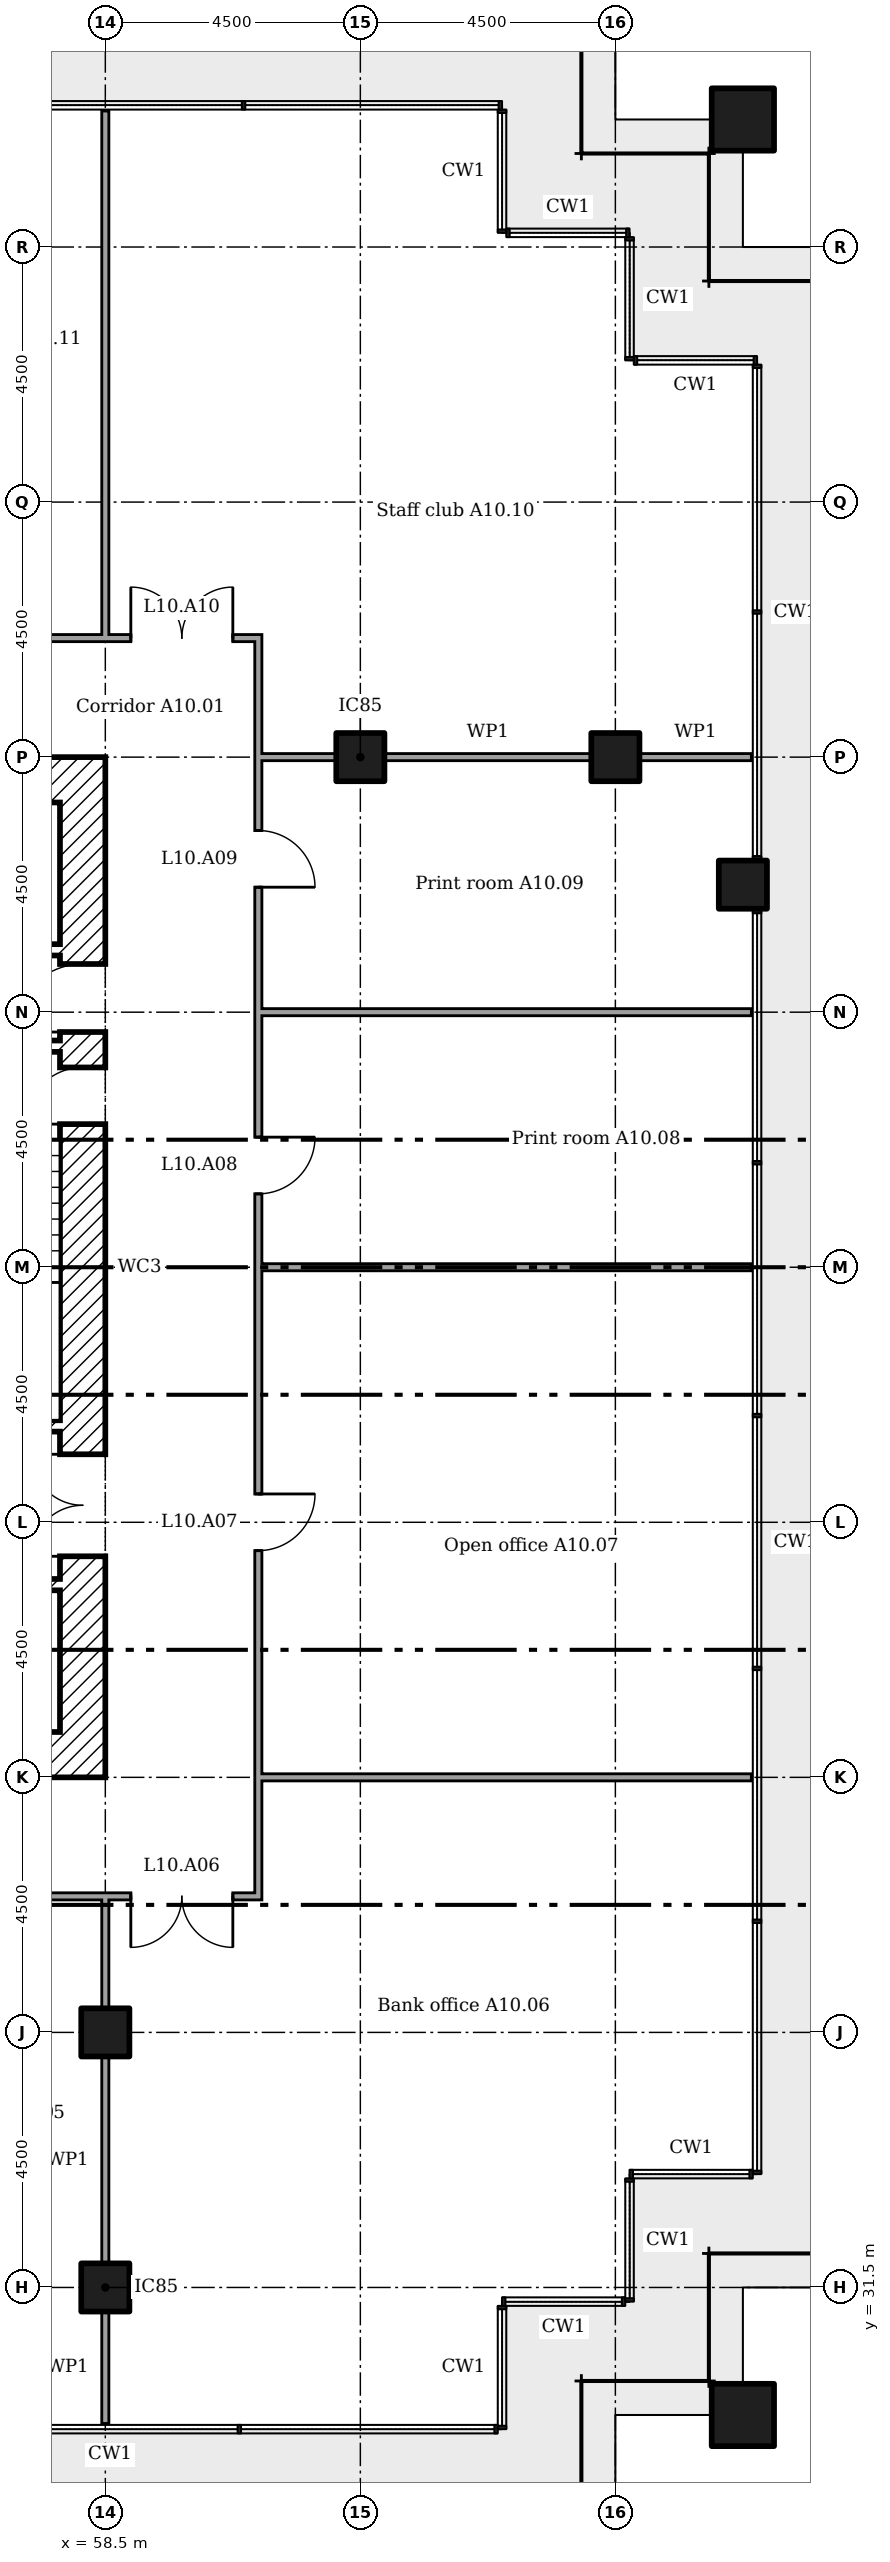
"""IFC4 building model, lengths in metres.
Left out: names, types, materials, properties, quantities, classifications, styles, units other than length and angle.
Written with IfcOpenShell. Run it as: python <this file> out.ifc"""

import sys

from ifc_helpers import new_model, si_unit, direction, frame, frame_2d, origin, origin_2d, place, context, subcontext, project, spatial, rectangle, extrude, element, fill, save


model = new_model("IFC4")
c1 = context("Model", 3, precision=1e-05, world=origin(), true_north=direction((0.0, 1.0)))
c2 = subcontext(c1, "Body", "Model", "MODEL_VIEW")
j1 = project(units=[si_unit("LENGTHUNIT", "METRE"), si_unit("PLANEANGLEUNIT", "RADIAN")], contexts=[c1])
p1 = place(None, origin())
s1 = spatial("IfcSite", under=j1, at=p1, CompositionType="ELEMENT")
p2 = place(p1, origin())
s2 = spatial("IfcBuilding", under=s1, at=p2, CompositionType="ELEMENT")
p3 = place(p2, frame((0.0, 0.0, 47.4)))
s3 = spatial("IfcBuildingStorey", under=s2, at=p3, CompositionType="ELEMENT", Elevation=47.4)
for number, where in (
    (1, (69.75, 29.25, 0.0)),
    (2, (69.75, 69.75, 0.0)),
):
    element("IfcColumn", number, at=place(p3, frame(where)), inside=s3, PredefinedType="COLUMN", context=c2, shape_type="SweptSolid", body=[
        extrude(rectangle(XDim=1.1, YDim=1.1, at=origin_2d()), origin(), (0.0, 0.0, 1.0), 3.6),
    ])
for number, where in (
    (3, (58.5, 31.5, 0.0)),
    (4, (58.5, 36.0, 0.0)),
    (5, (63.0, 58.5, 0.0)),
    (6, (67.5, 58.5, 0.0)),
    (7, (69.75, 56.25, 0.0)),
):
    element("IfcColumn", number, at=place(p3, frame(where)), inside=s3, PredefinedType="COLUMN", context=c2, shape_type="SweptSolid", body=[
        extrude(rectangle(XDim=0.85, YDim=0.85, at=origin_2d()), origin(), (0.0, 0.0, 1.0), 3.6),
    ])
p4 = place(p3, frame((58.1, 40.5, 0.0), z_axis=(0.0, 0.0, 1.0), x_axis=(0.0, 1.0, 0.0)))
e8 = element("IfcWall", 8, at=p4, inside=s3, PredefinedType="SHEAR", context=c2, shape_type="SweptSolid", body=[
    extrude(rectangle(XDim=18.0, YDim=0.8, at=frame_2d((9.0, 0.0))), origin(), (0.0, 0.0, 1.0), 3.35),
])
p5 = place(p4, frame((13.15, 0.0, 0.0)))
e9 = element("IfcOpeningElement", 9, at=p5, cuts=e8, PredefinedType="OPENING", context=c2, shape_type="SweptSolid", body=[
    extrude(rectangle(XDim=1.2, YDim=2.1, at=frame_2d((0.6, 1.05))), frame((0.0, 0.41, 0.0), z_axis=(0.0, -1.0, 0.0), x_axis=(1.0, 0.0, 0.0)), (0.0, 0.0, 1.0), 0.82),
])
p6 = place(p4, frame((3.9, 0.0, 0.0)))
e10 = element("IfcOpeningElement", 10, at=p6, cuts=e8, PredefinedType="OPENING", context=c2, shape_type="SweptSolid", body=[
    extrude(rectangle(XDim=1.8, YDim=2.1, at=frame_2d((0.9, 1.05))), frame((0.0, 0.41, 0.0), z_axis=(0.0, -1.0, 0.0), x_axis=(1.0, 0.0, 0.0)), (0.0, 0.0, 1.0), 0.82),
])
p7 = place(p4, frame((11.525, 0.0, 0.0)))
e11 = element("IfcOpeningElement", 11, at=p7, cuts=e8, PredefinedType="OPENING", context=c2, shape_type="SweptSolid", body=[
    extrude(rectangle(XDim=1.0, YDim=2.1, at=frame_2d((0.5, 1.05))), frame((0.0, 0.41, 0.0), z_axis=(0.0, -1.0, 0.0), x_axis=(1.0, 0.0, 0.0)), (0.0, 0.0, 1.0), 0.82),
])
for number, where in (
    (12, (41.3, 58.1, 0.0)),
    (13, (41.3, 40.9, 0.0)),
):
    element("IfcWall", number, at=place(p3, frame(where)), inside=s3, PredefinedType="SHEAR", context=c2, shape_type="SweptSolid", body=[
        extrude(rectangle(XDim=16.4, YDim=0.8, at=frame_2d((8.2, 0.0))), origin(), (0.0, 0.0, 1.0), 3.35),
    ])
p8 = place(p3, frame((46.933, 55.1, 0.0)))
e14 = element("IfcWall", 14, at=p8, inside=s3, PredefinedType="SHEAR", context=c2, shape_type="SweptSolid", body=[
    extrude(rectangle(XDim=10.767, YDim=0.2, at=frame_2d((5.383, 0.0))), origin(), (0.0, 0.0, 1.0), 3.35),
])
p9 = place(p8, frame((8.833, 0.0, 0.0)))
e15 = element("IfcOpeningElement", 15, at=p9, cuts=e14, PredefinedType="OPENING", context=c2, shape_type="SweptSolid", body=[
    extrude(rectangle(XDim=0.9, YDim=2.1, at=frame_2d((0.45, 1.05))), frame((0.0, 0.11, 0.0), z_axis=(0.0, -1.0, 0.0), x_axis=(1.0, 0.0, 0.0)), (0.0, 0.0, 1.0), 0.22),
])
p10 = place(p8, frame((3.45, 0.0, 0.0)))
e16 = element("IfcOpeningElement", 16, at=p10, cuts=e14, PredefinedType="OPENING", context=c2, shape_type="SweptSolid", body=[
    extrude(rectangle(XDim=0.9, YDim=2.1, at=frame_2d((0.45, 1.05))), frame((0.0, 0.11, 0.0), z_axis=(0.0, -1.0, 0.0), x_axis=(1.0, 0.0, 0.0)), (0.0, 0.0, 1.0), 0.22),
])
p11 = place(p3, frame((41.3, 43.9, 0.0)))
e17 = element("IfcWall", 17, at=p11, inside=s3, PredefinedType="SHEAR", context=c2, shape_type="SweptSolid", body=[
    extrude(rectangle(XDim=16.4, YDim=0.2, at=frame_2d((8.2, 0.0))), origin(), (0.0, 0.0, 1.0), 3.35),
])
p12 = place(p11, frame((0.933, 0.0, 0.0)))
e18 = element("IfcOpeningElement", 18, at=p12, cuts=e17, PredefinedType="OPENING", context=c2, shape_type="SweptSolid", body=[
    extrude(rectangle(XDim=1.2, YDim=2.1, at=frame_2d((0.6, 1.05))), frame((0.0, 0.11, 0.0), z_axis=(0.0, -1.0, 0.0), x_axis=(1.0, 0.0, 0.0)), (0.0, 0.0, 1.0), 0.22),
])
p13 = place(p11, frame((3.6, 0.0, 0.0)))
e19 = element("IfcOpeningElement", 19, at=p13, cuts=e17, PredefinedType="OPENING", context=c2, shape_type="SweptSolid", body=[
    extrude(rectangle(XDim=1.2, YDim=2.1, at=frame_2d((0.6, 1.05))), frame((0.0, 0.11, 0.0), z_axis=(0.0, -1.0, 0.0), x_axis=(1.0, 0.0, 0.0)), (0.0, 0.0, 1.0), 0.22),
])
p14 = place(p11, frame((6.267, 0.0, 0.0)))
e20 = element("IfcOpeningElement", 20, at=p14, cuts=e17, PredefinedType="OPENING", context=c2, shape_type="SweptSolid", body=[
    extrude(rectangle(XDim=1.2, YDim=2.1, at=frame_2d((0.6, 1.05))), frame((0.0, 0.11, 0.0), z_axis=(0.0, -1.0, 0.0), x_axis=(1.0, 0.0, 0.0)), (0.0, 0.0, 1.0), 0.22),
])
p15 = place(p11, frame((8.933, 0.0, 0.0)))
e21 = element("IfcOpeningElement", 21, at=p15, cuts=e17, PredefinedType="OPENING", context=c2, shape_type="SweptSolid", body=[
    extrude(rectangle(XDim=1.2, YDim=2.1, at=frame_2d((0.6, 1.05))), frame((0.0, 0.11, 0.0), z_axis=(0.0, -1.0, 0.0), x_axis=(1.0, 0.0, 0.0)), (0.0, 0.0, 1.0), 0.22),
])
p16 = place(p3, frame((54.8, 53.4, 0.0)))
e22 = element("IfcWall", 22, at=p16, inside=s3, PredefinedType="SHEAR", context=c2, shape_type="SweptSolid", body=[
    extrude(rectangle(XDim=2.9, YDim=0.2, at=frame_2d((1.45, 0.0))), origin(), (0.0, 0.0, 1.0), 3.35),
])
p17 = place(p16, frame((0.95, 0.0, 0.0)))
e23 = element("IfcOpeningElement", 23, at=p17, cuts=e22, PredefinedType="OPENING", context=c2, shape_type="SweptSolid", body=[
    extrude(rectangle(XDim=1.0, YDim=2.1, at=frame_2d((0.5, 1.05))), frame((0.0, 0.11, 0.0), z_axis=(0.0, -1.0, 0.0), x_axis=(1.0, 0.0, 0.0)), (0.0, 0.0, 1.0), 0.22),
])
p18 = place(p3, frame((54.8, 46.7, 0.0)))
e24 = element("IfcWall", 24, at=p18, inside=s3, PredefinedType="SHEAR", context=c2, shape_type="SweptSolid", body=[
    extrude(rectangle(XDim=2.9, YDim=0.2, at=frame_2d((1.45, 0.0))), origin(), (0.0, 0.0, 1.0), 3.35),
])
p19 = place(p3, frame((37.738, 38.4, 0.0)))
e25 = element("IfcWall", 25, at=p19, inside=s3, PredefinedType="PARTITIONING", context=c2, shape_type="SweptSolid", body=[
    extrude(rectangle(XDim=23.525, YDim=0.125, at=frame_2d((11.762, 0.0))), origin(), (0.0, 0.0, 1.0), 3.45),
])
p20 = place(p19, frame((0.512, 0.0, 0.0)))
e26 = element("IfcOpeningElement", 26, at=p20, cuts=e25, PredefinedType="OPENING", context=c2, shape_type="SweptSolid", body=[
    extrude(rectangle(XDim=1.8, YDim=2.1, at=frame_2d((0.9, 1.05))), frame((0.0, 0.073, 0.0), z_axis=(0.0, -1.0, 0.0), x_axis=(1.0, 0.0, 0.0)), (0.0, 0.0, 1.0), 0.145),
])
p21 = place(p19, frame((4.968, 0.0, 0.0)))
e27 = element("IfcOpeningElement", 27, at=p21, cuts=e25, PredefinedType="OPENING", context=c2, shape_type="SweptSolid", body=[
    extrude(rectangle(XDim=1.0, YDim=2.1, at=frame_2d((0.5, 1.05))), frame((0.0, 0.073, 0.0), z_axis=(0.0, -1.0, 0.0), x_axis=(1.0, 0.0, 0.0)), (0.0, 0.0, 1.0), 0.145),
])
p22 = place(p19, frame((11.262, 0.0, 0.0)))
e28 = element("IfcOpeningElement", 28, at=p22, cuts=e25, PredefinedType="OPENING", context=c2, shape_type="SweptSolid", body=[
    extrude(rectangle(XDim=1.0, YDim=2.1, at=frame_2d((0.5, 1.05))), frame((0.0, 0.073, 0.0), z_axis=(0.0, -1.0, 0.0), x_axis=(1.0, 0.0, 0.0)), (0.0, 0.0, 1.0), 0.145),
])
p23 = place(p19, frame((17.558, 0.0, 0.0)))
e29 = element("IfcOpeningElement", 29, at=p23, cuts=e25, PredefinedType="OPENING", context=c2, shape_type="SweptSolid", body=[
    extrude(rectangle(XDim=1.0, YDim=2.1, at=frame_2d((0.5, 1.05))), frame((0.0, 0.073, 0.0), z_axis=(0.0, -1.0, 0.0), x_axis=(1.0, 0.0, 0.0)), (0.0, 0.0, 1.0), 0.145),
])
p24 = place(p19, frame((21.212, 0.0, 0.0)))
e30 = element("IfcOpeningElement", 30, at=p24, cuts=e25, PredefinedType="OPENING", context=c2, shape_type="SweptSolid", body=[
    extrude(rectangle(XDim=1.8, YDim=2.1, at=frame_2d((0.9, 1.05))), frame((0.0, 0.073, 0.0), z_axis=(0.0, -1.0, 0.0), x_axis=(1.0, 0.0, 0.0)), (0.0, 0.0, 1.0), 0.145),
])
for number, where in (
    (31, (61.2, 40.5, 0.0)),
    (32, (61.2, 49.5, 0.0)),
    (33, (61.2, 54.0, 0.0)),
):
    element("IfcWall", number, at=place(p3, frame(where)), inside=s3, PredefinedType="PARTITIONING", context=c2, shape_type="SweptSolid", body=[
        extrude(rectangle(XDim=8.7, YDim=0.125, at=frame_2d((4.35, 0.0))), origin(), (0.0, 0.0, 1.0), 2.766),
    ])
p25 = place(p3, frame((61.2, 58.5, 0.0)))
e34 = element("IfcWall", 34, at=p25, inside=s3, PredefinedType="PARTITIONING", context=c2, shape_type="SweptSolid", body=[
    extrude(rectangle(XDim=1.375, YDim=0.125, at=frame_2d((0.688, 0.0))), origin(), (0.0, 0.0, 1.0), 2.676),
])
p26 = place(p3, frame((63.425, 58.5, 0.0)))
e35 = element("IfcWall", 35, at=p26, inside=s3, PredefinedType="PARTITIONING", context=c2, shape_type="SweptSolid", body=[
    extrude(rectangle(XDim=3.65, YDim=0.125, at=frame_2d((1.825, 0.0))), origin(), (0.0, 0.0, 1.0), 2.676),
])
p27 = place(p3, frame((67.925, 58.5, 0.0)))
e36 = element("IfcWall", 36, at=p27, inside=s3, PredefinedType="PARTITIONING", context=c2, shape_type="SweptSolid", body=[
    extrude(rectangle(XDim=1.975, YDim=0.125, at=frame_2d((0.987, 0.0))), origin(), (0.0, 0.0, 1.0), 2.676),
])
p28 = place(p3, frame((37.738, 60.6, 0.0)))
e37 = element("IfcWall", 37, at=p28, inside=s3, PredefinedType="PARTITIONING", context=c2, shape_type="SweptSolid", body=[
    extrude(rectangle(XDim=23.525, YDim=0.125, at=frame_2d((11.762, 0.0))), origin(), (0.0, 0.0, 1.0), 3.45),
])
p29 = place(p28, frame((21.212, 0.0, 0.0)))
e38 = element("IfcOpeningElement", 38, at=p29, cuts=e37, PredefinedType="OPENING", context=c2, shape_type="SweptSolid", body=[
    extrude(rectangle(XDim=1.8, YDim=2.1, at=frame_2d((0.9, 1.05))), frame((0.0, 0.073, 0.0), z_axis=(0.0, -1.0, 0.0), x_axis=(1.0, 0.0, 0.0)), (0.0, 0.0, 1.0), 0.145),
])
p30 = place(p28, frame((17.558, 0.0, 0.0)))
e39 = element("IfcOpeningElement", 39, at=p30, cuts=e37, PredefinedType="OPENING", context=c2, shape_type="SweptSolid", body=[
    extrude(rectangle(XDim=1.0, YDim=2.1, at=frame_2d((0.5, 1.05))), frame((0.0, 0.073, 0.0), z_axis=(0.0, -1.0, 0.0), x_axis=(1.0, 0.0, 0.0)), (0.0, 0.0, 1.0), 0.145),
])
p31 = place(p28, frame((13.968, 0.0, 0.0)))
e40 = element("IfcOpeningElement", 40, at=p31, cuts=e37, PredefinedType="OPENING", context=c2, shape_type="SweptSolid", body=[
    extrude(rectangle(XDim=1.0, YDim=2.1, at=frame_2d((0.5, 1.05))), frame((0.0, 0.073, 0.0), z_axis=(0.0, -1.0, 0.0), x_axis=(1.0, 0.0, 0.0)), (0.0, 0.0, 1.0), 0.145),
])
p32 = place(p28, frame((9.012, 0.0, 0.0)))
e41 = element("IfcOpeningElement", 41, at=p32, cuts=e37, PredefinedType="OPENING", context=c2, shape_type="SweptSolid", body=[
    extrude(rectangle(XDim=1.0, YDim=2.1, at=frame_2d((0.5, 1.05))), frame((0.0, 0.073, 0.0), z_axis=(0.0, -1.0, 0.0), x_axis=(1.0, 0.0, 0.0)), (0.0, 0.0, 1.0), 0.145),
])
p33 = place(p28, frame((4.058, 0.0, 0.0)))
e42 = element("IfcOpeningElement", 42, at=p33, cuts=e37, PredefinedType="OPENING", context=c2, shape_type="SweptSolid", body=[
    extrude(rectangle(XDim=1.0, YDim=2.1, at=frame_2d((0.5, 1.05))), frame((0.0, 0.073, 0.0), z_axis=(0.0, -1.0, 0.0), x_axis=(1.0, 0.0, 0.0)), (0.0, 0.0, 1.0), 0.145),
])
p34 = place(p28, frame((0.512, 0.0, 0.0)))
e43 = element("IfcOpeningElement", 43, at=p34, cuts=e37, PredefinedType="OPENING", context=c2, shape_type="SweptSolid", body=[
    extrude(rectangle(XDim=1.8, YDim=2.1, at=frame_2d((0.9, 1.05))), frame((0.0, 0.073, 0.0), z_axis=(0.0, -1.0, 0.0), x_axis=(1.0, 0.0, 0.0)), (0.0, 0.0, 1.0), 0.145),
])
p35 = place(p3, frame((58.5, 29.1, 0.0), z_axis=(0.0, 0.0, 1.0), x_axis=(0.0, 1.0, 0.0)))
e44 = element("IfcWall", 44, at=p35, inside=s3, PredefinedType="PARTITIONING", context=c2, shape_type="SweptSolid", body=[
    extrude(rectangle(XDim=1.975, YDim=0.125, at=frame_2d((0.987, 0.0))), origin(), (0.0, 0.0, 1.0), 2.676),
])
p36 = place(p3, frame((58.5, 31.925, 0.0), z_axis=(0.0, 0.0, 1.0), x_axis=(0.0, 1.0, 0.0)))
e45 = element("IfcWall", 45, at=p36, inside=s3, PredefinedType="PARTITIONING", context=c2, shape_type="SweptSolid", body=[
    extrude(rectangle(XDim=3.65, YDim=0.125, at=frame_2d((1.825, 0.0))), origin(), (0.0, 0.0, 1.0), 2.676),
])
p37 = place(p3, frame((58.5, 36.425, 0.0), z_axis=(0.0, 0.0, 1.0), x_axis=(0.0, 1.0, 0.0)))
e46 = element("IfcWall", 46, at=p37, inside=s3, PredefinedType="PARTITIONING", context=c2, shape_type="SweptSolid", body=[
    extrude(rectangle(XDim=1.975, YDim=0.125, at=frame_2d((0.987, 0.0))), origin(), (0.0, 0.0, 1.0), 2.676),
])
p38 = place(p3, frame((58.5, 60.6, 0.0), z_axis=(0.0, 0.0, 1.0), x_axis=(0.0, 1.0, 0.0)))
e47 = element("IfcWall", 47, at=p38, inside=s3, PredefinedType="PARTITIONING", context=c2, shape_type="SweptSolid", body=[
    extrude(rectangle(XDim=9.3, YDim=0.125, at=frame_2d((4.65, 0.0))), origin(), (0.0, 0.0, 1.0), 2.766),
])
p39 = place(p3, frame((61.2, 38.462, 0.0), z_axis=(0.0, 0.0, 1.0), x_axis=(0.0, 1.0, 0.0)))
e48 = element("IfcWall", 48, at=p39, inside=s3, PredefinedType="PARTITIONING", context=c2, shape_type="SweptSolid", body=[
    extrude(rectangle(XDim=22.075, YDim=0.125, at=frame_2d((11.038, 0.0))), origin(), (0.0, 0.0, 1.0), 3.45),
])
p40 = place(p39, frame((6.038, 0.0, 0.0)))
e49 = element("IfcOpeningElement", 49, at=p40, cuts=e48, PredefinedType="OPENING", context=c2, shape_type="SweptSolid", body=[
    extrude(rectangle(XDim=1.0, YDim=2.1, at=frame_2d((0.5, 1.05))), frame((0.0, 0.073, 0.0), z_axis=(0.0, -1.0, 0.0), x_axis=(1.0, 0.0, 0.0)), (0.0, 0.0, 1.0), 0.145),
])
p41 = place(p39, frame((12.333, 0.0, 0.0)))
e50 = element("IfcOpeningElement", 50, at=p41, cuts=e48, PredefinedType="OPENING", context=c2, shape_type="SweptSolid", body=[
    extrude(rectangle(XDim=1.0, YDim=2.1, at=frame_2d((0.5, 1.05))), frame((0.0, 0.073, 0.0), z_axis=(0.0, -1.0, 0.0), x_axis=(1.0, 0.0, 0.0)), (0.0, 0.0, 1.0), 0.145),
])
p42 = place(p39, frame((17.742, 0.0, 0.0)))
e51 = element("IfcOpeningElement", 51, at=p42, cuts=e48, PredefinedType="OPENING", context=c2, shape_type="SweptSolid", body=[
    extrude(rectangle(XDim=1.0, YDim=2.1, at=frame_2d((0.5, 1.05))), frame((0.0, 0.073, 0.0), z_axis=(0.0, -1.0, 0.0), x_axis=(1.0, 0.0, 0.0)), (0.0, 0.0, 1.0), 0.145),
])
p43 = place(p5, origin())
e52 = element("IfcDoor", 52, at=p43, inside=s3, OperationType="SINGLE_SWING_RIGHT", PredefinedType="DOOR", context=c2, shape_type="SweptSolid", body=[
    extrude(rectangle(XDim=1.2, YDim=2.1, at=frame_2d((0.6, 1.05))), frame((0.0, 0.025, 0.0), z_axis=(0.0, -1.0, 0.0), x_axis=(1.0, 0.0, 0.0)), (0.0, 0.0, 1.0), 0.05),
])
fill(e9, e52)
p44 = place(p6, origin())
e53 = element("IfcDoor", 53, at=p44, inside=s3, OperationType="DOUBLE_DOOR_SINGLE_SWING", PredefinedType="DOOR", context=c2, shape_type="SweptSolid", body=[
    extrude(rectangle(XDim=1.8, YDim=2.1, at=frame_2d((0.9, 1.05))), frame((0.0, 0.025, 0.0), z_axis=(0.0, -1.0, 0.0), x_axis=(1.0, 0.0, 0.0)), (0.0, 0.0, 1.0), 0.05),
])
fill(e10, e53)
p45 = place(p7, origin())
e54 = element("IfcDoor", 54, at=p45, inside=s3, OperationType="SINGLE_SWING_RIGHT", PredefinedType="DOOR", context=c2, shape_type="SweptSolid", body=[
    extrude(rectangle(XDim=1.0, YDim=2.1, at=frame_2d((0.5, 1.05))), frame((0.0, 0.025, 0.0), z_axis=(0.0, -1.0, 0.0), x_axis=(1.0, 0.0, 0.0)), (0.0, 0.0, 1.0), 0.05),
])
fill(e11, e54)
p46 = place(p24, frame((1.8, 0.0, 0.0), x_axis=(-1.0, 0.0, 0.0)))
e55 = element("IfcDoor", 55, at=p46, inside=s3, OperationType="DOUBLE_DOOR_SINGLE_SWING", PredefinedType="DOOR", context=c2, shape_type="SweptSolid", body=[
    extrude(rectangle(XDim=1.8, YDim=2.1, at=frame_2d((0.9, 1.05))), frame((0.0, 0.025, 0.0), z_axis=(0.0, -1.0, 0.0), x_axis=(1.0, 0.0, 0.0)), (0.0, 0.0, 1.0), 0.05),
])
fill(e30, e55)
p47 = place(p40, frame((1.0, 0.0, 0.0), x_axis=(-1.0, 0.0, 0.0)))
e56 = element("IfcDoor", 56, at=p47, inside=s3, OperationType="SINGLE_SWING_RIGHT", PredefinedType="DOOR", context=c2, shape_type="SweptSolid", body=[
    extrude(rectangle(XDim=1.0, YDim=2.1, at=frame_2d((0.5, 1.05))), frame((0.0, 0.025, 0.0), z_axis=(0.0, -1.0, 0.0), x_axis=(1.0, 0.0, 0.0)), (0.0, 0.0, 1.0), 0.05),
])
fill(e49, e56)
p48 = place(p41, frame((1.0, 0.0, 0.0), x_axis=(-1.0, 0.0, 0.0)))
e57 = element("IfcDoor", 57, at=p48, inside=s3, OperationType="SINGLE_SWING_RIGHT", PredefinedType="DOOR", context=c2, shape_type="SweptSolid", body=[
    extrude(rectangle(XDim=1.0, YDim=2.1, at=frame_2d((0.5, 1.05))), frame((0.0, 0.025, 0.0), z_axis=(0.0, -1.0, 0.0), x_axis=(1.0, 0.0, 0.0)), (0.0, 0.0, 1.0), 0.05),
])
fill(e50, e57)
p49 = place(p42, frame((1.0, 0.0, 0.0), x_axis=(-1.0, 0.0, 0.0)))
e58 = element("IfcDoor", 58, at=p49, inside=s3, OperationType="SINGLE_SWING_LEFT", PredefinedType="DOOR", context=c2, shape_type="SweptSolid", body=[
    extrude(rectangle(XDim=1.0, YDim=2.1, at=frame_2d((0.5, 1.05))), frame((0.0, 0.025, 0.0), z_axis=(0.0, -1.0, 0.0), x_axis=(1.0, 0.0, 0.0)), (0.0, 0.0, 1.0), 0.05),
])
fill(e51, e58)
p50 = place(p29, origin())
e59 = element("IfcDoor", 59, at=p50, inside=s3, OperationType="DOUBLE_DOOR_SINGLE_SWING", PredefinedType="DOOR", context=c2, shape_type="SweptSolid", body=[
    extrude(rectangle(XDim=1.8, YDim=2.1, at=frame_2d((0.9, 1.05))), frame((0.0, 0.025, 0.0), z_axis=(0.0, -1.0, 0.0), x_axis=(1.0, 0.0, 0.0)), (0.0, 0.0, 1.0), 0.05),
])
fill(e38, e59)
save(model, sys.argv[1])
